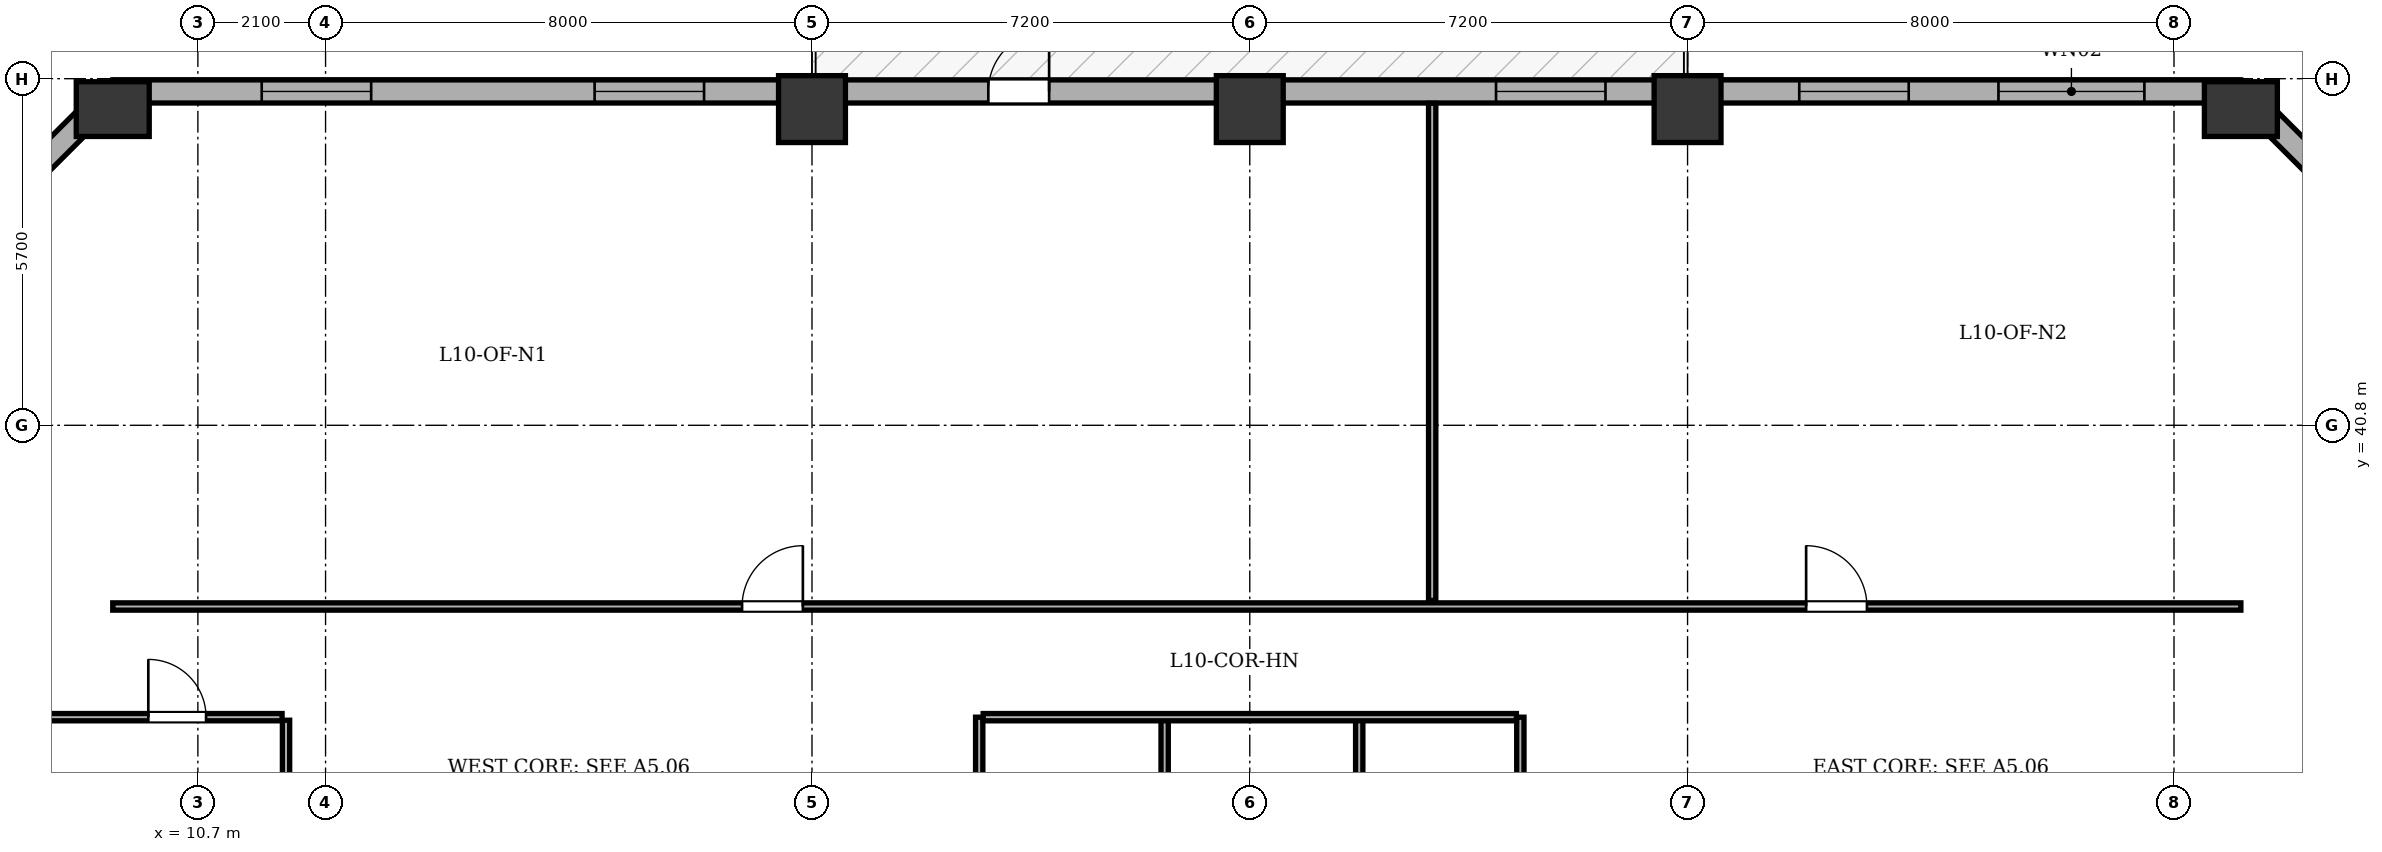
"""IFC4 building model, lengths in metres.
Left out: names, types, materials, properties, quantities, classifications, styles, units other than length and angle.
Written with IfcOpenShell. Run it as: python <this file> out.ifc"""

import sys

from ifc_helpers import new_model, si_unit, direction, frame, frame_2d, origin, origin_2d, place, context, subcontext, project, spatial, rectangle, extrude, element, fill, save


model = new_model("IFC4")
c1 = context("Model", 3, precision=1e-05, world=origin(), true_north=direction((0.0, 1.0)))
c2 = subcontext(c1, "Body", "Model", "MODEL_VIEW")
j1 = project(units=[si_unit("LENGTHUNIT", "METRE"), si_unit("PLANEANGLEUNIT", "RADIAN")], contexts=[c1])
p1 = place(None, origin())
s1 = spatial("IfcSite", under=j1, at=p1, CompositionType="ELEMENT")
p2 = place(p1, origin())
s2 = spatial("IfcBuilding", under=s1, at=p2, CompositionType="ELEMENT")
p3 = place(p2, frame((0.0, 0.0, 43.8)))
s3 = spatial("IfcBuildingStorey", under=s2, at=p3, CompositionType="ELEMENT", Elevation=43.8)
p4 = place(p3, frame((9.3, 46.0, 0.0), z_axis=(0.0, 0.0, 1.0), x_axis=(1.0, 0.0, 0.0)))
e1 = element("IfcColumn", 1, at=p4, inside=s3, PredefinedType="COLUMN", context=c2, shape_type="SweptSolid", body=[
    extrude(rectangle(XDim=0.9, YDim=1.2, at=origin_2d()), origin(), (0.0, 0.0, 1.0), 3.9),
])
for number, where, z_axis, x_axis in (
    (2, (20.8, 46.0, 0.0), (0.0, 0.0, 1.0), (1.0, 0.0, 0.0)),
    (3, (28.0, 46.0, 0.0), (0.0, 0.0, 1.0), (1.0, 0.0, 0.0)),
    (4, (35.2, 46.0, 0.0), (0.0, 0.0, 1.0), (1.0, 0.0, 0.0)),
):
    element("IfcColumn", number, at=place(p3, frame(where, z_axis=z_axis, x_axis=x_axis)), inside=s3, PredefinedType="COLUMN", context=c2, shape_type="SweptSolid", body=[
        extrude(rectangle(XDim=1.1, YDim=1.1, at=origin_2d()), origin(), (0.0, 0.0, 1.0), 3.9),
    ])
p5 = place(p3, frame((44.3, 46.0, 0.0), z_axis=(0.0, 0.0, 1.0), x_axis=(1.0, 0.0, 0.0)))
e5 = element("IfcColumn", 5, at=p5, inside=s3, PredefinedType="COLUMN", context=c2, shape_type="SweptSolid", body=[
    extrude(rectangle(XDim=0.9, YDim=1.2, at=origin_2d()), origin(), (0.0, 0.0, 1.0), 3.9),
])
p6 = place(p3, frame((4.51, 41.5, 0.0), z_axis=(0.0, 0.0, 1.0), x_axis=(0.707106781187, 0.707106781187, 0.0)))
e6 = element("IfcWall", 6, at=p6, inside=s3, PredefinedType="STANDARD", context=c2, shape_type="SweptSolid", body=[
    extrude(rectangle(XDim=6.774, YDim=0.38, at=frame_2d((3.387, 0.0))), origin(), (0.0, 0.0, 1.0), 2.835),
])
p7 = place(p6, frame((2.687, 0.0, 0.8)))
e7 = element("IfcOpeningElement", 7, at=p7, cuts=e6, PredefinedType="OPENING", context=c2, shape_type="SweptSolid", body=[
    extrude(rectangle(XDim=1.4, YDim=1.65, at=frame_2d((0.7, 0.825))), frame((0.0, 0.2, 0.0), z_axis=(0.0, -1.0, 0.0), x_axis=(1.0, 0.0, 0.0)), (0.0, 0.0, 1.0), 0.4),
])
p8 = place(p3, frame((9.3, 46.29, 0.0), z_axis=(0.0, 0.0, 1.0), x_axis=(1.0, 0.0, 0.0)))
e8 = element("IfcWall", 8, at=p8, inside=s3, PredefinedType="STANDARD", context=c2, shape_type="SweptSolid", body=[
    extrude(rectangle(XDim=35.0, YDim=0.38, at=frame_2d((17.5, 0.0))), origin(), (0.0, 0.0, 1.0), 2.835),
])
p9 = place(p8, frame((14.4, 0.0, 0.0)))
e9 = element("IfcOpeningElement", 9, at=p9, cuts=e8, PredefinedType="OPENING", context=c2, shape_type="SweptSolid", body=[
    extrude(rectangle(XDim=1.0, YDim=2.02, at=frame_2d((0.5, 1.01))), frame((0.0, 0.2, 0.0), z_axis=(0.0, -1.0, 0.0), x_axis=(1.0, 0.0, 0.0)), (0.0, 0.0, 1.0), 0.4),
])
p10 = place(p8, frame((2.45, 0.0, 0.8)))
e10 = element("IfcOpeningElement", 10, at=p10, cuts=e8, PredefinedType="OPENING", context=c2, shape_type="SweptSolid", body=[
    extrude(rectangle(XDim=1.8, YDim=1.9, at=frame_2d((0.9, 0.95))), frame((0.0, 0.2, 0.0), z_axis=(0.0, -1.0, 0.0), x_axis=(1.0, 0.0, 0.0)), (0.0, 0.0, 1.0), 0.4),
])
p11 = place(p8, frame((7.925, 0.0, 0.8)))
e11 = element("IfcOpeningElement", 11, at=p11, cuts=e8, PredefinedType="OPENING", context=c2, shape_type="SweptSolid", body=[
    extrude(rectangle(XDim=1.8, YDim=1.9, at=frame_2d((0.9, 0.95))), frame((0.0, 0.2, 0.0), z_axis=(0.0, -1.0, 0.0), x_axis=(1.0, 0.0, 0.0)), (0.0, 0.0, 1.0), 0.4),
])
p12 = place(p8, frame((22.75, 0.0, 0.8)))
e12 = element("IfcOpeningElement", 12, at=p12, cuts=e8, PredefinedType="OPENING", context=c2, shape_type="SweptSolid", body=[
    extrude(rectangle(XDim=1.8, YDim=1.9, at=frame_2d((0.9, 0.95))), frame((0.0, 0.2, 0.0), z_axis=(0.0, -1.0, 0.0), x_axis=(1.0, 0.0, 0.0)), (0.0, 0.0, 1.0), 0.4),
])
p13 = place(p8, frame((27.737, 0.0, 0.8)))
e13 = element("IfcOpeningElement", 13, at=p13, cuts=e8, PredefinedType="OPENING", context=c2, shape_type="SweptSolid", body=[
    extrude(rectangle(XDim=1.8, YDim=1.9, at=frame_2d((0.9, 0.95))), frame((0.0, 0.2, 0.0), z_axis=(0.0, -1.0, 0.0), x_axis=(1.0, 0.0, 0.0)), (0.0, 0.0, 1.0), 0.4),
])
p14 = place(p8, frame((31.013, 0.0, 0.8)))
e14 = element("IfcOpeningElement", 14, at=p14, cuts=e8, PredefinedType="OPENING", context=c2, shape_type="SweptSolid", body=[
    extrude(rectangle(XDim=2.4, YDim=1.9, at=frame_2d((1.2, 0.95))), frame((0.0, 0.2, 0.0), z_axis=(0.0, -1.0, 0.0), x_axis=(1.0, 0.0, 0.0)), (0.0, 0.0, 1.0), 0.4),
])
p15 = place(p3, frame((44.3, 46.29, 0.0), z_axis=(0.0, 0.0, 1.0), x_axis=(0.707106781187, -0.707106781187, 0.0)))
e15 = element("IfcWall", 15, at=p15, inside=s3, PredefinedType="STANDARD", context=c2, shape_type="SweptSolid", body=[
    extrude(rectangle(XDim=6.774, YDim=0.38, at=frame_2d((3.387, 0.0))), origin(), (0.0, 0.0, 1.0), 2.835),
])
p16 = place(p15, frame((2.687, 0.0, 0.8)))
e16 = element("IfcOpeningElement", 16, at=p16, cuts=e15, PredefinedType="OPENING", context=c2, shape_type="SweptSolid", body=[
    extrude(rectangle(XDim=1.4, YDim=1.65, at=frame_2d((0.7, 0.825))), frame((0.0, 0.2, 0.0), z_axis=(0.0, -1.0, 0.0), x_axis=(1.0, 0.0, 0.0)), (0.0, 0.0, 1.0), 0.4),
])
for number, where, z_axis, x_axis in (
    (17, (23.55, 24.715, 0.0), (0.0, 0.0, 1.0), (0.0, 1.0, 0.0)),
    (18, (32.45, 24.715, 0.0), (0.0, 0.0, 1.0), (0.0, 1.0, 0.0)),
    (19, (26.6, 24.715, 0.0), (0.0, 0.0, 1.0), (0.0, 1.0, 0.0)),
):
    element("IfcWall", number, at=place(p3, frame(where, z_axis=z_axis, x_axis=x_axis)), inside=s3, PredefinedType="PARTITIONING", context=c2, shape_type="SweptSolid", body=[
        extrude(rectangle(XDim=11.285, YDim=0.12, at=frame_2d((5.643, 0.0))), origin(), (0.0, 0.0, 1.0), 3.45),
    ])
p17 = place(p3, frame((29.8, 24.715, 0.0), z_axis=(0.0, 0.0, 1.0), x_axis=(0.0, 1.0, 0.0)))
e20 = element("IfcWall", 20, at=p17, inside=s3, PredefinedType="PARTITIONING", context=c2, shape_type="SweptSolid", body=[
    extrude(rectangle(XDim=11.285, YDim=0.12, at=frame_2d((5.643, 0.0))), origin(), (0.0, 0.0, 1.0), 2.885),
])
p18 = place(p3, frame((23.615, 36.0, 0.0), z_axis=(0.0, 0.0, 1.0), x_axis=(1.0, 0.0, 0.0)))
e21 = element("IfcWall", 21, at=p18, inside=s3, PredefinedType="PARTITIONING", context=c2, shape_type="SweptSolid", body=[
    extrude(rectangle(XDim=8.77, YDim=0.12, at=frame_2d((4.385, 0.0))), origin(), (0.0, 0.0, 1.0), 3.45),
])
p19 = place(p3, frame((9.3, 37.82, 0.0), z_axis=(0.0, 0.0, 1.0), x_axis=(1.0, 0.0, 0.0)))
e22 = element("IfcWall", 22, at=p19, inside=s3, PredefinedType="PARTITIONING", context=c2, shape_type="SweptSolid", body=[
    extrude(rectangle(XDim=35.0, YDim=0.12, at=frame_2d((17.5, 0.0))), origin(), (0.0, 0.0, 1.0), 3.45),
])
p20 = place(p19, frame((10.35, 0.0, 0.0)))
e23 = element("IfcOpeningElement", 23, at=p20, cuts=e22, PredefinedType="OPENING", context=c2, shape_type="SweptSolid", body=[
    extrude(rectangle(XDim=1.0, YDim=2.1, at=frame_2d((0.5, 1.05))), frame((0.0, 0.07, 0.0), z_axis=(0.0, -1.0, 0.0), x_axis=(1.0, 0.0, 0.0)), (0.0, 0.0, 1.0), 0.14),
])
p21 = place(p19, frame((27.85, 0.0, 0.0)))
e24 = element("IfcOpeningElement", 24, at=p21, cuts=e22, PredefinedType="OPENING", context=c2, shape_type="SweptSolid", body=[
    extrude(rectangle(XDim=1.0, YDim=2.1, at=frame_2d((0.5, 1.05))), frame((0.0, 0.07, 0.0), z_axis=(0.0, -1.0, 0.0), x_axis=(1.0, 0.0, 0.0)), (0.0, 0.0, 1.0), 0.14),
])
p22 = place(p3, frame((31.0, 37.92, 0.0), z_axis=(0.0, 0.0, 1.0), x_axis=(0.0, 1.0, 0.0)))
e25 = element("IfcWall", 25, at=p22, inside=s3, PredefinedType="PARTITIONING", context=c2, shape_type="SweptSolid", body=[
    extrude(rectangle(XDim=8.175, YDim=0.12, at=frame_2d((4.087, 0.0))), origin(), (0.0, 0.0, 1.0), 3.45),
])
p23 = place(p3, frame((12.15, 18.45, 0.0), z_axis=(0.0, 0.0, 1.0), x_axis=(0.0, 1.0, 0.0)))
e26 = element("IfcWall", 26, at=p23, inside=s3, PredefinedType="PARTITIONING", context=c2, shape_type="SweptSolid", body=[
    extrude(rectangle(XDim=17.5, YDim=0.12, at=frame_2d((8.75, 0.0))), origin(), (0.0, 0.0, 1.0), 3.45),
])
p24 = place(p3, frame((4.705, 36.0, 0.0), z_axis=(0.0, 0.0, 1.0), x_axis=(1.0, 0.0, 0.0)))
e27 = element("IfcWall", 27, at=p24, inside=s3, PredefinedType="PARTITIONING", context=c2, shape_type="SweptSolid", body=[
    extrude(rectangle(XDim=7.38, YDim=0.12, at=frame_2d((3.69, 0.0))), origin(), (0.0, 0.0, 1.0), 3.45),
])
p25 = place(p24, frame((5.18, 0.0, 0.0)))
e28 = element("IfcOpeningElement", 28, at=p25, cuts=e27, PredefinedType="OPENING", context=c2, shape_type="SweptSolid", body=[
    extrude(rectangle(XDim=0.95, YDim=2.1, at=frame_2d((0.475, 1.05))), frame((0.0, 0.07, 0.0), z_axis=(0.0, -1.0, 0.0), x_axis=(1.0, 0.0, 0.0)), (0.0, 0.0, 1.0), 0.14),
])
p26 = place(p9, origin())
e29 = element("IfcDoor", 29, at=p26, inside=s3, OperationType="SINGLE_SWING_RIGHT", PredefinedType="DOOR", context=c2, shape_type="SweptSolid", body=[
    extrude(rectangle(XDim=1.0, YDim=2.02, at=frame_2d((0.5, 1.01))), frame((0.0, 0.025, 0.0), z_axis=(0.0, -1.0, 0.0), x_axis=(1.0, 0.0, 0.0)), (0.0, 0.0, 1.0), 0.05),
])
fill(e9, e29)
p27 = place(p10, origin())
e30 = element("IfcWindow", 30, at=p27, inside=s3, PartitioningType="SINGLE_PANEL", PredefinedType="WINDOW", context=c2, shape_type="SweptSolid", body=[
    extrude(rectangle(XDim=1.8, YDim=1.9, at=frame_2d((0.9, 0.95))), frame((0.0, -0.01, 0.0), z_axis=(0.0, -1.0, 0.0), x_axis=(1.0, 0.0, 0.0)), (0.0, 0.0, 1.0), 0.06),
])
fill(e10, e30)
p28 = place(p11, origin())
e31 = element("IfcWindow", 31, at=p28, inside=s3, PartitioningType="SINGLE_PANEL", PredefinedType="WINDOW", context=c2, shape_type="SweptSolid", body=[
    extrude(rectangle(XDim=1.8, YDim=1.9, at=frame_2d((0.9, 0.95))), frame((0.0, -0.01, 0.0), z_axis=(0.0, -1.0, 0.0), x_axis=(1.0, 0.0, 0.0)), (0.0, 0.0, 1.0), 0.06),
])
fill(e11, e31)
p29 = place(p12, origin())
e32 = element("IfcWindow", 32, at=p29, inside=s3, PartitioningType="SINGLE_PANEL", PredefinedType="WINDOW", context=c2, shape_type="SweptSolid", body=[
    extrude(rectangle(XDim=1.8, YDim=1.9, at=frame_2d((0.9, 0.95))), frame((0.0, -0.01, 0.0), z_axis=(0.0, -1.0, 0.0), x_axis=(1.0, 0.0, 0.0)), (0.0, 0.0, 1.0), 0.06),
])
fill(e12, e32)
p30 = place(p13, origin())
e33 = element("IfcWindow", 33, at=p30, inside=s3, PartitioningType="SINGLE_PANEL", PredefinedType="WINDOW", context=c2, shape_type="SweptSolid", body=[
    extrude(rectangle(XDim=1.8, YDim=1.9, at=frame_2d((0.9, 0.95))), frame((0.0, -0.01, 0.0), z_axis=(0.0, -1.0, 0.0), x_axis=(1.0, 0.0, 0.0)), (0.0, 0.0, 1.0), 0.06),
])
fill(e13, e33)
p31 = place(p14, origin())
e34 = element("IfcWindow", 34, at=p31, inside=s3, PartitioningType="SINGLE_PANEL", PredefinedType="WINDOW", context=c2, shape_type="SweptSolid", body=[
    extrude(rectangle(XDim=2.4, YDim=1.9, at=frame_2d((1.2, 0.95))), frame((0.0, -0.01, 0.0), z_axis=(0.0, -1.0, 0.0), x_axis=(1.0, 0.0, 0.0)), (0.0, 0.0, 1.0), 0.06),
])
fill(e14, e34)
p32 = place(p20, origin())
e35 = element("IfcDoor", 35, at=p32, inside=s3, OperationType="SINGLE_SWING_RIGHT", PredefinedType="DOOR", context=c2, shape_type="SweptSolid", body=[
    extrude(rectangle(XDim=1.0, YDim=2.1, at=frame_2d((0.5, 1.05))), frame((0.0, 0.025, 0.0), z_axis=(0.0, -1.0, 0.0), x_axis=(1.0, 0.0, 0.0)), (0.0, 0.0, 1.0), 0.05),
])
fill(e23, e35)
p33 = place(p21, origin())
e36 = element("IfcDoor", 36, at=p33, inside=s3, OperationType="SINGLE_SWING_LEFT", PredefinedType="DOOR", context=c2, shape_type="SweptSolid", body=[
    extrude(rectangle(XDim=1.0, YDim=2.1, at=frame_2d((0.5, 1.05))), frame((0.0, 0.025, 0.0), z_axis=(0.0, -1.0, 0.0), x_axis=(1.0, 0.0, 0.0)), (0.0, 0.0, 1.0), 0.05),
])
fill(e24, e36)
p34 = place(p25, origin())
e37 = element("IfcDoor", 37, at=p34, inside=s3, OperationType="SINGLE_SWING_LEFT", PredefinedType="DOOR", context=c2, shape_type="SweptSolid", body=[
    extrude(rectangle(XDim=0.95, YDim=2.1, at=frame_2d((0.475, 1.05))), frame((0.0, 0.025, 0.0), z_axis=(0.0, -1.0, 0.0), x_axis=(1.0, 0.0, 0.0)), (0.0, 0.0, 1.0), 0.05),
])
fill(e28, e37)
save(model, sys.argv[1])
